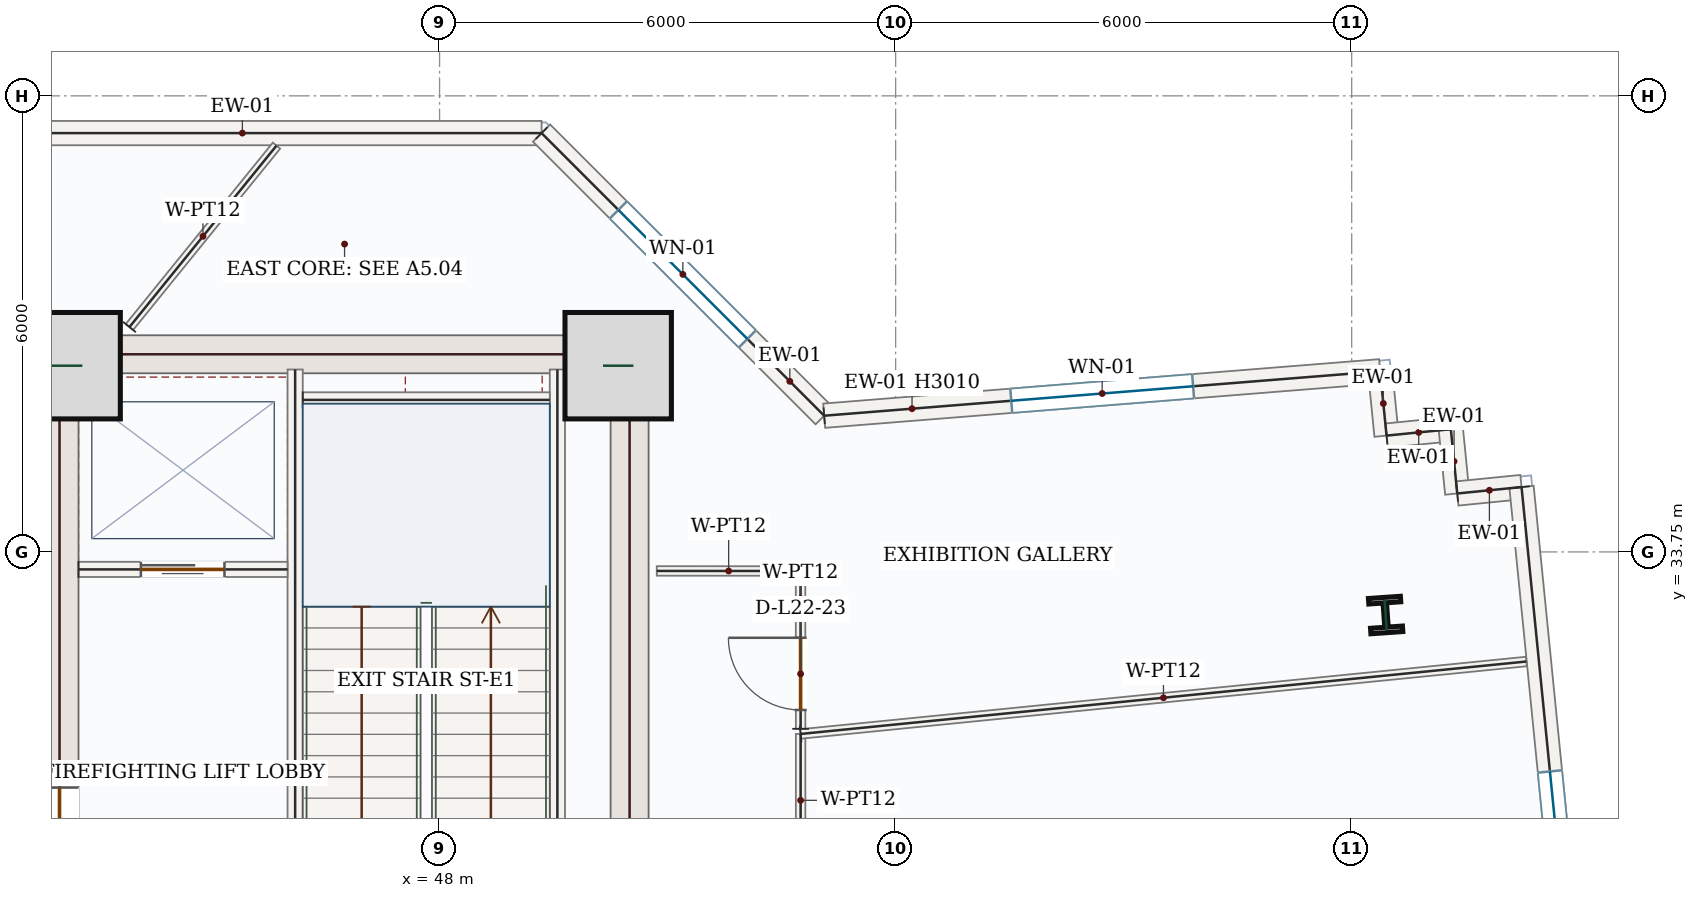
"""IFC4 building model, lengths in metres.
Left out: names, types, materials, properties, quantities, classifications, styles, units other than length and angle.
Written with IfcOpenShell. Run it as: python <this file> out.ifc"""

import sys

from ifc_helpers import new_model, si_unit, direction, frame, frame_2d, origin, origin_2d, place, context, subcontext, project, spatial, rectangle, i_section, extrude, source, transform, mapped, element, fill, save


model = new_model("IFC4")
c1 = context("Model", 3, precision=1e-05, world=origin(), true_north=direction((0.0, 1.0)))
c2 = subcontext(c1, "Body", "Model", "MODEL_VIEW")
j1 = project(units=[si_unit("LENGTHUNIT", "METRE"), si_unit("PLANEANGLEUNIT", "RADIAN")], contexts=[c1])
p1 = place(None, origin())
s1 = spatial("IfcSite", under=j1, at=p1, CompositionType="ELEMENT")
p2 = place(p1, origin())
s2 = spatial("IfcBuilding", under=s1, at=p2, CompositionType="ELEMENT")
p3 = place(p2, frame((0.0, 0.0, 100.5)))
s3 = spatial("IfcBuildingStorey", under=s2, at=p3, CompositionType="ELEMENT", Elevation=100.5)
p4 = place(p3, frame((43.0, 28.05, 0.0), z_axis=(0.0, 0.0, 1.0), x_axis=(0.0, 1.0, 0.0)))
e1 = element("IfcWall", 1, at=p4, inside=s3, PredefinedType="SHEAR", context=c2, shape_type="SweptSolid", body=[
    extrude(rectangle(XDim=8.55, YDim=0.5, at=frame_2d((4.275, 0.0))), origin(), (0.0, 0.0, 1.0), 3.95),
])
p5 = place(p4, frame((1.5, 0.0, 0.0)))
e2 = element("IfcOpeningElement", 2, at=p5, cuts=e1, PredefinedType="OPENING", context=c2, shape_type="SweptSolid", body=[
    extrude(rectangle(XDim=1.1, YDim=2.2, at=frame_2d((0.55, 1.1))), frame((0.0, 0.26, 0.0), z_axis=(0.0, -1.0, 0.0), x_axis=(1.0, 0.0, 0.0)), (0.0, 0.0, 1.0), 0.52),
])
m1 = source(origin(), c2, "Body", "SweptSolid", [
    extrude(rectangle(XDim=8.55, YDim=0.5, at=frame_2d((4.275, 0.0))), origin(), (0.0, 0.0, 1.0), 3.95),
])
p6 = place(p3, frame((50.5, 28.05, 0.0), z_axis=(0.0, 0.0, 1.0), x_axis=(0.0, 1.0, 0.0)))
e3 = element("IfcWall", 3, at=p6, inside=s3, PredefinedType="SHEAR", context=c2, shape_type="MappedRepresentation", body=[
    mapped(m1, transform((0.0, 0.0, 0.0), x_axis=(1.0, 0.0, 0.0), y_axis=(0.0, 1.0, 0.0), z_axis=(0.0, 0.0, 1.0), scale=1.0)),
])
m2 = source(origin(), c2, "Body", "SweptSolid", [
    extrude(rectangle(XDim=7.0, YDim=0.5, at=frame_2d((3.5, 0.0))), origin(), (0.0, 0.0, 1.0), 3.95),
])
p7 = place(p3, frame((43.25, 36.35, 0.0), z_axis=(0.0, 0.0, 1.0), x_axis=(1.0, 0.0, 0.0)))
e4 = element("IfcWall", 4, at=p7, inside=s3, PredefinedType="SHEAR", context=c2, shape_type="MappedRepresentation", body=[
    mapped(m2, transform((0.0, 0.0, 0.0), x_axis=(1.0, 0.0, 0.0), y_axis=(0.0, 1.0, 0.0), z_axis=(0.0, 0.0, 1.0), scale=1.0)),
])
m3 = source(origin(), c2, "Body", "SweptSolid", [
    extrude(rectangle(XDim=1.4, YDim=1.4, at=origin_2d()), origin(), (0.0, 0.0, 1.0), 4.2),
])
for number, where, z_axis, x_axis in (
    (5, (43.1, 36.2, 0.0), (0.0, 0.0, 1.0), (1.0, 0.0, 0.0)),
    (6, (50.35, 36.2, 0.0), (0.0, 0.0, 1.0), (1.0, 0.0, 0.0)),
):
    element("IfcColumn", number, at=place(p3, frame(where, z_axis=z_axis, x_axis=x_axis)), inside=s3, PredefinedType="COLUMN", context=c2, shape_type="MappedRepresentation", body=[
        mapped(m3, transform((0.0, 0.0, 0.0), x_axis=(1.0, 0.0, 0.0), y_axis=(0.0, 1.0, 0.0), z_axis=(0.0, 0.0, 1.0), scale=1.0)),
    ])
m4 = source(origin(), c2, "Body", "SweptSolid", [
    extrude(i_section(OverallWidth=0.421, OverallDepth=0.465, WebThickness=0.045, FlangeThickness=0.073, FilletRadius=0.018, at=origin_2d()), origin(), (0.0, 0.0, 1.0), 4.2),
])
p8 = place(p3, frame((60.447, 32.92, 0.0), z_axis=(0.0, 0.0, 1.0), x_axis=(0.99756405026, 0.069756473744, 0.0)))
e7 = element("IfcColumn", 7, at=p8, inside=s3, PredefinedType="COLUMN", context=c2, shape_type="MappedRepresentation", body=[
    mapped(m4, transform((0.0, 0.0, 0.0), x_axis=(1.0, 0.0, 0.0), y_axis=(0.0, 1.0, 0.0), z_axis=(0.0, 0.0, 1.0), scale=1.0)),
])
m5 = source(origin(), c2, "Body", "SweptSolid", [
    extrude(rectangle(XDim=7.873, YDim=0.32, at=frame_2d((3.936, 0.0))), origin(), (0.0, 0.0, 1.0), 3.95),
])
p9 = place(p3, frame((41.469, 39.26, 0.0), z_axis=(0.0, 0.0, 1.0), x_axis=(1.0, 0.0, 0.0)))
e8 = element("IfcWall", 8, at=p9, inside=s3, PredefinedType="SOLIDWALL", context=c2, shape_type="MappedRepresentation", body=[
    mapped(m5, transform((0.0, 0.0, 0.0), x_axis=(1.0, 0.0, 0.0), y_axis=(0.0, 1.0, 0.0), z_axis=(0.0, 0.0, 1.0), scale=1.0)),
])
p10 = place(p3, frame((49.342, 39.26, 0.0), z_axis=(0.0, 0.0, 1.0), x_axis=(0.707106781187, -0.707106781187, 0.0)))
e9 = element("IfcWall", 9, at=p10, inside=s3, PredefinedType="SOLIDWALL", context=c2, shape_type="SweptSolid", body=[
    extrude(rectangle(XDim=5.258, YDim=0.32, at=frame_2d((2.629, 0.0))), origin(), (0.0, 0.0, 1.0), 3.95),
])
p11 = place(p10, frame((1.429, 0.0, 0.85)))
e10 = element("IfcOpeningElement", 10, at=p11, cuts=e9, PredefinedType="OPENING", context=c2, shape_type="SweptSolid", body=[
    extrude(rectangle(XDim=2.4, YDim=1.8, at=frame_2d((1.2, 0.9))), frame((0.0, 0.17, 0.0), z_axis=(0.0, -1.0, 0.0), x_axis=(1.0, 0.0, 0.0)), (0.0, 0.0, 1.0), 0.34),
])
p12 = place(p3, frame((53.06, 35.542, 0.0), z_axis=(0.0, 0.0, 1.0), x_axis=(0.996827539556, 0.079591811023, 0.0)))
e11 = element("IfcWall", 11, at=p12, inside=s3, PredefinedType="SOLIDWALL", context=c2, shape_type="SweptSolid", body=[
    extrude(rectangle(XDim=7.337, YDim=0.32, at=frame_2d((3.668, 0.0))), origin(), (0.0, 0.0, 1.0), 3.01),
])
p13 = place(p12, frame((2.469, 0.0, 0.85)))
e12 = element("IfcOpeningElement", 12, at=p13, cuts=e11, PredefinedType="OPENING", context=c2, shape_type="SweptSolid", body=[
    extrude(rectangle(XDim=2.4, YDim=1.8, at=frame_2d((1.2, 0.9))), frame((0.0, 0.17, 0.0), z_axis=(0.0, -1.0, 0.0), x_axis=(1.0, 0.0, 0.0)), (0.0, 0.0, 1.0), 0.34),
])
m6 = source(origin(), c2, "Body", "SweptSolid", [
    extrude(rectangle(XDim=0.85, YDim=0.32, at=frame_2d((0.425, 0.0))), origin(), (0.0, 0.0, 1.0), 3.95),
])
p14 = place(p3, frame((60.374, 36.126, 0.0), z_axis=(0.0, 0.0, 1.0), x_axis=(0.09938995433, -0.995048560111, 0.0)))
e13 = element("IfcWall", 13, at=p14, inside=s3, PredefinedType="SOLIDWALL", context=c2, shape_type="MappedRepresentation", body=[
    mapped(m6, transform((0.0, 0.0, 0.0), x_axis=(1.0, 0.0, 0.0), y_axis=(0.0, 1.0, 0.0), z_axis=(0.0, 0.0, 1.0), scale=1.0)),
])
m7 = source(origin(), c2, "Body", "SweptSolid", [
    extrude(rectangle(XDim=0.85, YDim=0.32, at=frame_2d((0.425, 0.0))), origin(), (0.0, 0.0, 1.0), 3.95),
])
p15 = place(p3, frame((60.458, 35.28, 0.0), z_axis=(0.0, 0.0, 1.0), x_axis=(0.995079749343, 0.09907720448, 0.0)))
e14 = element("IfcWall", 14, at=p15, inside=s3, PredefinedType="SOLIDWALL", context=c2, shape_type="MappedRepresentation", body=[
    mapped(m7, transform((0.0, 0.0, 0.0), x_axis=(1.0, 0.0, 0.0), y_axis=(0.0, 1.0, 0.0), z_axis=(0.0, 0.0, 1.0), scale=1.0)),
])
for number, where, z_axis, x_axis in (
    (15, (61.304, 35.365, 0.0), (0.0, 0.0, 1.0), (0.099, -0.995, 0.0)),
    (16, (61.389, 34.519, 0.0), (0.0, 0.0, 1.0), (0.995, 0.099, 0.0)),
):
    element("IfcWall", number, at=place(p3, frame(where, z_axis=z_axis, x_axis=x_axis)), inside=s3, PredefinedType="SOLIDWALL", context=c2, shape_type="MappedRepresentation", body=[
        mapped(m6, transform((0.0, 0.0, 0.0), x_axis=(1.0, 0.0, 0.0), y_axis=(0.0, 1.0, 0.0), z_axis=(0.0, 0.0, 1.0), scale=1.0)),
    ])
p16 = place(p3, frame((62.235, 34.603, 0.0), z_axis=(0.0, 0.0, 1.0), x_axis=(0.099303907908, -0.995057151059, 0.0)))
e17 = element("IfcWall", 17, at=p16, inside=s3, PredefinedType="SOLIDWALL", context=c2, shape_type="SweptSolid", body=[
    extrude(rectangle(XDim=9.92, YDim=0.32, at=frame_2d((4.96, 0.0))), origin(), (0.0, 0.0, 1.0), 3.95),
])
p17 = place(p16, frame((3.76, 0.0, 0.85)))
e18 = element("IfcOpeningElement", 18, at=p17, cuts=e17, PredefinedType="OPENING", context=c2, shape_type="SweptSolid", body=[
    extrude(rectangle(XDim=2.4, YDim=1.8, at=frame_2d((1.2, 0.9))), frame((0.0, 0.17, 0.0), z_axis=(0.0, -1.0, 0.0), x_axis=(1.0, 0.0, 0.0)), (0.0, 0.0, 1.0), 0.34),
])
m8 = source(origin(), c2, "Body", "SweptSolid", [
    extrude(rectangle(XDim=7.87, YDim=0.2, at=frame_2d((3.935, 0.0))), origin(), (0.0, 0.0, 1.0), 3.95),
])
p18 = place(p3, frame((49.55, 28.28, 0.0), z_axis=(0.0, 0.0, 1.0), x_axis=(0.0, 1.0, 0.0)))
e19 = element("IfcWall", 19, at=p18, inside=s3, PredefinedType="SOLIDWALL", context=c2, shape_type="MappedRepresentation", body=[
    mapped(m8, transform((0.0, 0.0, 0.0), x_axis=(1.0, 0.0, 0.0), y_axis=(0.0, 1.0, 0.0), z_axis=(0.0, 0.0, 1.0), scale=1.0)),
])
p19 = place(p3, frame((46.1, 28.15, 0.0), z_axis=(0.0, 0.0, 1.0), x_axis=(0.0, 1.0, 0.0)))
e20 = element("IfcWall", 20, at=p19, inside=s3, PredefinedType="SOLIDWALL", context=c2, shape_type="SweptSolid", body=[
    extrude(rectangle(XDim=8.0, YDim=0.2, at=frame_2d((4.0, 0.0))), origin(), (0.0, 0.0, 1.0), 3.95),
])
p20 = place(p19, frame((0.4, 0.0, 0.0)))
e21 = element("IfcOpeningElement", 21, at=p20, cuts=e20, PredefinedType="OPENING", context=c2, shape_type="SweptSolid", body=[
    extrude(rectangle(XDim=1.05, YDim=2.15, at=frame_2d((0.525, 1.075))), frame((0.0, 0.11, 0.0), z_axis=(0.0, -1.0, 0.0), x_axis=(1.0, 0.0, 0.0)), (0.0, 0.0, 1.0), 0.22),
])
m9 = source(origin(), c2, "Body", "SweptSolid", [
    extrude(rectangle(XDim=3.25, YDim=0.2, at=frame_2d((1.625, 0.0))), origin(), (0.0, 0.0, 1.0), 3.95),
])
p21 = place(p3, frame((46.2, 35.75, 0.0), z_axis=(0.0, 0.0, 1.0), x_axis=(1.0, 0.0, 0.0)))
e22 = element("IfcWall", 22, at=p21, inside=s3, PredefinedType="SOLIDWALL", context=c2, shape_type="MappedRepresentation", body=[
    mapped(m9, transform((0.0, 0.0, 0.0), x_axis=(1.0, 0.0, 0.0), y_axis=(0.0, 1.0, 0.0), z_axis=(0.0, 0.0, 1.0), scale=1.0)),
])
p22 = place(p3, frame((43.25, 33.52, 0.0), z_axis=(0.0, 0.0, 1.0), x_axis=(1.0, 0.0, 0.0)))
e23 = element("IfcWall", 23, at=p22, inside=s3, PredefinedType="SOLIDWALL", context=c2, shape_type="SweptSolid", body=[
    extrude(rectangle(XDim=2.75, YDim=0.2, at=frame_2d((1.375, 0.0))), origin(), (0.0, 0.0, 1.0), 3.95),
])
p23 = place(p22, frame((0.82, 0.0, 0.0)))
e24 = element("IfcOpeningElement", 24, at=p23, cuts=e23, PredefinedType="OPENING", context=c2, shape_type="SweptSolid", body=[
    extrude(rectangle(XDim=1.1, YDim=2.15, at=frame_2d((0.55, 1.075))), frame((0.0, 0.11, 0.0), z_axis=(0.0, -1.0, 0.0), x_axis=(1.0, 0.0, 0.0)), (0.0, 0.0, 1.0), 0.22),
])
p24 = place(p3, frame((52.75, 26.612, 0.0), z_axis=(0.0, 0.0, 1.0), x_axis=(0.0, 1.0, 0.0)))
e25 = element("IfcWall", 25, at=p24, inside=s3, PredefinedType="PARTITIONING", context=c2, shape_type="SweptSolid", body=[
    extrude(rectangle(XDim=4.743, YDim=0.125, at=frame_2d((2.372, 0.0))), origin(), (0.0, 0.0, 1.0), 3.95),
])
p25 = place(p24, frame((1.897, 0.0, 0.0)))
e26 = element("IfcOpeningElement", 26, at=p25, cuts=e25, PredefinedType="OPENING", context=c2, shape_type="SweptSolid", body=[
    extrude(rectangle(XDim=0.95, YDim=2.15, at=frame_2d((0.475, 1.075))), frame((0.0, 0.073, 0.0), z_axis=(0.0, -1.0, 0.0), x_axis=(1.0, 0.0, 0.0)), (0.0, 0.0, 1.0), 0.145),
])
m10 = source(origin(), c2, "Body", "SweptSolid", [
    extrude(rectangle(XDim=9.595, YDim=0.125, at=frame_2d((4.798, 0.0))), origin(), (0.0, 0.0, 1.0), 3.95),
])
p26 = place(p3, frame((52.75, 31.355, 0.0), z_axis=(0.0, 0.0, 1.0), x_axis=(0.995054305912, 0.099332413068, 0.0)))
e27 = element("IfcWall", 27, at=p26, inside=s3, PredefinedType="PARTITIONING", context=c2, shape_type="MappedRepresentation", body=[
    mapped(m10, transform((0.0, 0.0, 0.0), x_axis=(1.0, 0.0, 0.0), y_axis=(0.0, 1.0, 0.0), z_axis=(0.0, 0.0, 1.0), scale=1.0)),
])
m11 = source(origin(), c2, "Body", "SweptSolid", [
    extrude(rectangle(XDim=3.072, YDim=0.125, at=frame_2d((1.536, 0.0))), origin(), (0.0, 0.0, 1.0), 3.95),
])
p27 = place(p3, frame((43.92, 36.709, 0.0), z_axis=(0.0, 0.0, 1.0), x_axis=(0.629760486176, 0.776789373029, 0.0)))
e28 = element("IfcWall", 28, at=p27, inside=s3, PredefinedType="PARTITIONING", context=c2, shape_type="MappedRepresentation", body=[
    mapped(m11, transform((0.0, 0.0, 0.0), x_axis=(1.0, 0.0, 0.0), y_axis=(0.0, 1.0, 0.0), z_axis=(0.0, 0.0, 1.0), scale=1.0)),
])
p28 = place(p3, frame((52.75, 31.423, 0.0), z_axis=(0.0, 0.0, 1.0), x_axis=(-0.000470366834, 0.999999889378, 0.0)))
e29 = element("IfcWall", 29, at=p28, inside=s3, PredefinedType="PARTITIONING", context=c2, shape_type="SweptSolid", body=[
    extrude(rectangle(XDim=2.076, YDim=0.125, at=frame_2d((1.038, 0.0))), origin(), (0.0, 0.0, 1.0), 3.95),
])
p29 = place(p28, frame((0.248, 0.0, 0.0)))
e30 = element("IfcOpeningElement", 30, at=p29, cuts=e29, PredefinedType="OPENING", context=c2, shape_type="SweptSolid", body=[
    extrude(rectangle(XDim=0.95, YDim=2.15, at=frame_2d((0.475, 1.075))), frame((0.0, 0.073, 0.0), z_axis=(0.0, -1.0, 0.0), x_axis=(1.0, 0.0, 0.0)), (0.0, 0.0, 1.0), 0.145),
])
m12 = source(origin(), c2, "Body", "SweptSolid", [
    extrude(rectangle(XDim=1.891, YDim=0.125, at=frame_2d((0.946, 0.0))), origin(), (0.0, 0.0, 1.0), 3.95),
])
p30 = place(p3, frame((52.749, 33.499, 0.0), z_axis=(0.0, 0.0, 1.0), x_axis=(-0.99999992502, 0.000387246647, 0.0)))
e31 = element("IfcWall", 31, at=p30, inside=s3, PredefinedType="PARTITIONING", context=c2, shape_type="MappedRepresentation", body=[
    mapped(m12, transform((0.0, 0.0, 0.0), x_axis=(1.0, 0.0, 0.0), y_axis=(0.0, 1.0, 0.0), z_axis=(0.0, 0.0, 1.0), scale=1.0)),
])
m13 = source(origin(), c2, "Body", "SweptSolid", [
    extrude(rectangle(XDim=2.4, YDim=1.8, at=frame_2d((1.2, 0.9))), frame((0.0, 0.03, 0.0), z_axis=(0.0, -1.0, 0.0), x_axis=(1.0, 0.0, 0.0)), (0.0, 0.0, 1.0), 0.06),
])
p31 = place(p11, origin())
e32 = element("IfcWindow", 32, at=p31, inside=s3, PartitioningType="DOUBLE_PANEL_VERTICAL", PredefinedType="WINDOW", context=c2, shape_type="MappedRepresentation", body=[
    mapped(m13, transform((0.0, 0.0, 0.0), x_axis=(1.0, 0.0, 0.0), y_axis=(0.0, 1.0, 0.0), z_axis=(0.0, 0.0, 1.0), scale=1.0)),
])
fill(e10, e32)
p32 = place(p13, origin())
e33 = element("IfcWindow", 33, at=p32, inside=s3, PartitioningType="DOUBLE_PANEL_VERTICAL", PredefinedType="WINDOW", context=c2, shape_type="MappedRepresentation", body=[
    mapped(m13, transform((0.0, 0.0, 0.0), x_axis=(1.0, 0.0, 0.0), y_axis=(0.0, 1.0, 0.0), z_axis=(0.0, 0.0, 1.0), scale=1.0)),
])
fill(e12, e33)
p33 = place(p17, origin())
e34 = element("IfcWindow", 34, at=p33, inside=s3, PartitioningType="DOUBLE_PANEL_VERTICAL", PredefinedType="WINDOW", context=c2, shape_type="MappedRepresentation", body=[
    mapped(m13, transform((0.0, 0.0, 0.0), x_axis=(1.0, 0.0, 0.0), y_axis=(0.0, 1.0, 0.0), z_axis=(0.0, 0.0, 1.0), scale=1.0)),
])
fill(e18, e34)
m14 = source(origin(), c2, "Body", "SweptSolid", [
    extrude(rectangle(XDim=1.1, YDim=2.15, at=frame_2d((0.55, 1.075))), frame((0.0, 0.025, 0.0), z_axis=(0.0, -1.0, 0.0), x_axis=(1.0, 0.0, 0.0)), (0.0, 0.0, 1.0), 0.05),
])
p34 = place(p23, origin())
e35 = element("IfcDoor", 35, at=p34, inside=s3, OperationType="DOUBLE_DOOR_SLIDING", PredefinedType="DOOR", context=c2, shape_type="MappedRepresentation", body=[
    mapped(m14, transform((0.0, 0.0, 0.0), x_axis=(1.0, 0.0, 0.0), y_axis=(0.0, 1.0, 0.0), z_axis=(0.0, 0.0, 1.0), scale=1.0)),
])
fill(e24, e35)
m15 = source(origin(), c2, "Body", "SweptSolid", [
    extrude(rectangle(XDim=1.1, YDim=2.2, at=frame_2d((0.55, 1.1))), frame((0.0, 0.025, 0.0), z_axis=(0.0, -1.0, 0.0), x_axis=(1.0, 0.0, 0.0)), (0.0, 0.0, 1.0), 0.05),
])
p35 = place(p5, origin())
e36 = element("IfcDoor", 36, at=p35, inside=s3, OperationType="SINGLE_SWING_LEFT", PredefinedType="DOOR", context=c2, shape_type="MappedRepresentation", body=[
    mapped(m15, transform((0.0, 0.0, 0.0), x_axis=(1.0, 0.0, 0.0), y_axis=(0.0, 1.0, 0.0), z_axis=(0.0, 0.0, 1.0), scale=1.0)),
])
fill(e2, e36)
m16 = source(origin(), c2, "Body", "SweptSolid", [
    extrude(rectangle(XDim=0.95, YDim=2.15, at=frame_2d((0.475, 1.075))), frame((0.0, 0.025, 0.0), z_axis=(0.0, -1.0, 0.0), x_axis=(1.0, 0.0, 0.0)), (0.0, 0.0, 1.0), 0.05),
])
p36 = place(p29, origin())
e37 = element("IfcDoor", 37, at=p36, inside=s3, OperationType="SINGLE_SWING_RIGHT", PredefinedType="DOOR", context=c2, shape_type="MappedRepresentation", body=[
    mapped(m16, transform((0.0, 0.0, 0.0), x_axis=(1.0, 0.0, 0.0), y_axis=(0.0, 1.0, 0.0), z_axis=(0.0, 0.0, 1.0), scale=1.0)),
])
fill(e30, e37)
save(model, sys.argv[1])
